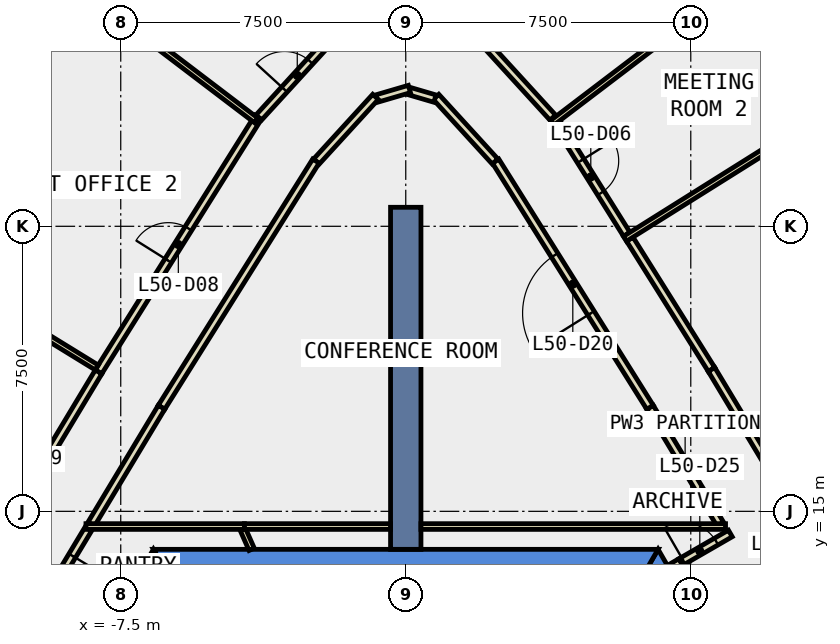
"""IFC4 building model, lengths in metres.
Left out: names, types, materials, properties, quantities, classifications, styles, units other than length and angle.
Written with IfcOpenShell. Run it as: python <this file> out.ifc"""

import sys

from ifc_helpers import new_model, si_unit, direction, frame, frame_2d, origin, place, context, subcontext, project, spatial, polyline, rectangle, outline, extrude, element, fill, save


model = new_model("IFC4")
c1 = context("Model", 3, precision=1e-05, world=origin(), true_north=direction((0.0, 1.0)))
c2 = subcontext(c1, "Body", "Model", "MODEL_VIEW")
j1 = project(units=[si_unit("LENGTHUNIT", "METRE"), si_unit("PLANEANGLEUNIT", "RADIAN")], contexts=[c1])
p1 = place(None, origin())
s1 = spatial("IfcSite", under=j1, at=p1, CompositionType="ELEMENT")
p2 = place(p1, origin())
s2 = spatial("IfcBuilding", under=s1, at=p2, CompositionType="ELEMENT")
p3 = place(p2, frame((0.0, 0.0, 223.4)))
s3 = spatial("IfcBuildingStorey", under=s2, at=p3, CompositionType="ELEMENT", Elevation=223.4)
p4 = place(p3, frame((0.0, 0.0, -0.4)))
e1 = element("IfcWall", 1, at=p4, inside=s3, PredefinedType="SHEAR", context=c2, shape_type="SweptSolid", body=[
    extrude(outline(polyline([(6.478, 12.88), (7.084, 13.23), (6.64, 14.0), (6.235, 13.3), (6.478, 12.88)])), origin(), (0.0, 0.0, 1.0), 4.2),
])
p5 = place(p3, frame((0.0, 0.0, -0.4)))
e2 = element("IfcWall", 2, at=p5, inside=s3, PredefinedType="SHEAR", context=c2, shape_type="SweptSolid", body=[
    extrude(outline(polyline([(6.64, 14.0), (-6.64, 14.0), (-6.235, 13.3), (6.235, 13.3), (6.64, 14.0)])), origin(), (0.0, 0.0, 1.0), 4.2),
])
p6 = place(p3, frame((0.0, 0.0, -0.4)))
e3 = element("IfcWall", 3, at=p6, inside=s3, PredefinedType="SHEAR", context=c2, shape_type="SweptSolid", body=[
    extrude(outline(polyline([(-11.834, 5.002), (-11.228, 4.652), (-6.235, 13.3), (-6.64, 14.0), (-11.834, 5.002)])), origin(), (0.0, 0.0, 1.0), 4.2),
])
p7 = place(p3, frame((0.0, 14.0, -0.4), z_axis=(0.0, 0.0, 1.0), x_axis=(0.0, 1.0, 0.0)))
e4 = element("IfcWall", 4, at=p7, inside=s3, PredefinedType="SHEAR", context=c2, shape_type="SweptSolid", body=[
    extrude(rectangle(XDim=9.0, YDim=0.8, at=frame_2d((4.5, 0.0))), origin(), (0.0, 0.0, 1.0), 4.2),
])
p8 = place(p3, frame((13.021, 22.374, 0.0), z_axis=(0.0, 0.0, 1.0), x_axis=(-0.531239262679, 0.847221839773, 0.0)))
e5 = element("IfcWall", 5, at=p8, inside=s3, PredefinedType="STANDARD", context=c2, shape_type="SweptSolid", body=[
    extrude(rectangle(XDim=7.339, YDim=0.3, at=frame_2d((3.67, 0.0))), origin(), (0.0, 0.0, 1.0), 3.8),
])
p9 = place(p8, frame((0.635, 0.0, 0.9)))
e6 = element("IfcOpeningElement", 6, at=p9, cuts=e5, PredefinedType="OPENING", context=c2, shape_type="SweptSolid", body=[
    extrude(rectangle(XDim=2.4, YDim=2.6, at=frame_2d((1.2, 1.3))), frame((0.0, 0.16, 0.0), z_axis=(0.0, -1.0, 0.0), x_axis=(1.0, 0.0, 0.0)), (0.0, 0.0, 1.0), 0.32),
])
p10 = place(p8, frame((4.304, 0.0, 0.9)))
e7 = element("IfcOpeningElement", 7, at=p10, cuts=e5, PredefinedType="OPENING", context=c2, shape_type="SweptSolid", body=[
    extrude(rectangle(XDim=2.4, YDim=2.6, at=frame_2d((1.2, 1.3))), frame((0.0, 0.16, 0.0), z_axis=(0.0, -1.0, 0.0), x_axis=(1.0, 0.0, 0.0)), (0.0, 0.0, 1.0), 0.32),
])
p11 = place(p3, frame((-9.122, 28.592, 0.0), z_axis=(0.0, 0.0, 1.0), x_axis=(-0.531239262679, -0.847221839773, 0.0)))
e8 = element("IfcWall", 8, at=p11, inside=s3, PredefinedType="STANDARD", context=c2, shape_type="SweptSolid", body=[
    extrude(rectangle(XDim=7.339, YDim=0.3, at=frame_2d((3.67, 0.0))), origin(), (0.0, 0.0, 1.0), 3.8),
])
p12 = place(p11, frame((0.635, 0.0, 0.9)))
e9 = element("IfcOpeningElement", 9, at=p12, cuts=e8, PredefinedType="OPENING", context=c2, shape_type="SweptSolid", body=[
    extrude(rectangle(XDim=2.4, YDim=2.6, at=frame_2d((1.2, 1.3))), frame((0.0, 0.16, 0.0), z_axis=(0.0, -1.0, 0.0), x_axis=(1.0, 0.0, 0.0)), (0.0, 0.0, 1.0), 0.32),
])
p13 = place(p11, frame((4.304, 0.0, 0.9)))
e10 = element("IfcOpeningElement", 10, at=p13, cuts=e8, PredefinedType="OPENING", context=c2, shape_type="SweptSolid", body=[
    extrude(rectangle(XDim=2.4, YDim=2.6, at=frame_2d((1.2, 1.3))), frame((0.0, 0.16, 0.0), z_axis=(0.0, -1.0, 0.0), x_axis=(1.0, 0.0, 0.0)), (0.0, 0.0, 1.0), 0.32),
])
p14 = place(p3, frame((6.934, 13.49, 0.0), z_axis=(0.0, 0.0, 1.0), x_axis=(0.865871789474, 0.500265973451, 0.0)))
e11 = element("IfcWall", 11, at=p14, inside=s3, PredefinedType="PARTITIONING", context=c2, shape_type="SweptSolid", body=[
    extrude(rectangle(XDim=0.35, YDim=0.2, at=frame_2d((0.175, 0.0))), origin(), (0.0, 0.0, 1.0), 2.4),
])
p15 = place(p3, frame((-8.353, 14.536, 0.0), z_axis=(0.0, 0.0, 1.0), x_axis=(-0.515636196259, -0.856807628997, 0.0)))
e12 = element("IfcWall", 12, at=p15, inside=s3, PredefinedType="PARTITIONING", context=c2, shape_type="SweptSolid", body=[
    extrude(rectangle(XDim=2.643, YDim=0.2, at=frame_2d((1.322, 0.0))), origin(), (0.0, 0.0, 1.0), 3.8),
])
p16 = place(p15, frame((0.822, 0.0, 0.0)))
e13 = element("IfcOpeningElement", 13, at=p16, cuts=e12, PredefinedType="OPENING", context=c2, shape_type="SweptSolid", body=[
    extrude(rectangle(XDim=1.0, YDim=2.1, at=frame_2d((0.5, 1.05))), frame((0.0, 0.11, 0.0), z_axis=(0.0, -1.0, 0.0), x_axis=(1.0, 0.0, 0.0)), (0.0, 0.0, 1.0), 0.22),
])
p17 = place(p3, frame((8.276, 14.664, 0.0), z_axis=(0.0, 0.0, 1.0), x_axis=(-0.515416266777, 0.85693994652, 0.0)))
e14 = element("IfcWall", 14, at=p17, inside=s3, PredefinedType="PARTITIONING", context=c2, shape_type="SweptSolid", body=[
    extrude(rectangle(XDim=3.587, YDim=0.2, at=frame_2d((1.793, 0.0))), origin(), (0.0, 0.0, 1.0), 3.8),
])
p18 = place(p3, frame((6.427, 17.738, 0.0), z_axis=(0.0, 0.0, 1.0), x_axis=(-0.531335643981, 0.847161397512, 0.0)))
e15 = element("IfcWall", 15, at=p18, inside=s3, PredefinedType="PARTITIONING", context=c2, shape_type="SweptSolid", body=[
    extrude(rectangle(XDim=7.647, YDim=0.2, at=frame_2d((3.823, 0.0))), origin(), (0.0, 0.0, 1.0), 3.8),
])
p19 = place(p18, frame((2.923, 0.0, 0.0)))
e16 = element("IfcOpeningElement", 16, at=p19, cuts=e15, PredefinedType="OPENING", context=c2, shape_type="SweptSolid", body=[
    extrude(rectangle(XDim=1.8, YDim=2.1, at=frame_2d((0.9, 1.05))), frame((0.0, 0.11, 0.0), z_axis=(0.0, -1.0, 0.0), x_axis=(1.0, 0.0, 0.0)), (0.0, 0.0, 1.0), 0.22),
])
p20 = place(p3, frame((2.35, 24.205, 0.0), z_axis=(0.0, 0.0, 1.0), x_axis=(-0.67475930229, 0.738037860799, 0.0)))
e17 = element("IfcWall", 17, at=p20, inside=s3, PredefinedType="PARTITIONING", context=c2, shape_type="SweptSolid", body=[
    extrude(rectangle(XDim=2.303, YDim=0.2, at=frame_2d((1.152, 0.0))), origin(), (0.0, 0.0, 1.0), 3.8),
])
p21 = place(p3, frame((0.768, 25.86, 0.0), z_axis=(0.0, 0.0, 1.0), x_axis=(-0.959714481723, 0.280977069476, 0.0)))
e18 = element("IfcWall", 18, at=p21, inside=s3, PredefinedType="PARTITIONING", context=c2, shape_type="SweptSolid", body=[
    extrude(rectangle(XDim=0.7, YDim=0.2, at=frame_2d((0.35, 0.0))), origin(), (0.0, 0.0, 1.0), 3.8),
])
p22 = place(p3, frame((0.096, 26.113, 0.0), z_axis=(0.0, 0.0, 1.0), x_axis=(-0.959723140705, -0.280947491882, 0.0)))
e19 = element("IfcWall", 19, at=p22, inside=s3, PredefinedType="PARTITIONING", context=c2, shape_type="SweptSolid", body=[
    extrude(rectangle(XDim=0.9, YDim=0.2, at=frame_2d((0.45, 0.0))), origin(), (0.0, 0.0, 1.0), 3.8),
])
p23 = place(p3, frame((-0.796, 25.905, 0.0), z_axis=(0.0, 0.0, 1.0), x_axis=(-0.67475930229, -0.738037860799, 0.0)))
e20 = element("IfcWall", 20, at=p23, inside=s3, PredefinedType="PARTITIONING", context=c2, shape_type="SweptSolid", body=[
    extrude(rectangle(XDim=2.303, YDim=0.2, at=frame_2d((1.152, 0.0))), origin(), (0.0, 0.0, 1.0), 3.8),
])
p24 = place(p3, frame((-2.364, 24.216, 0.0), z_axis=(0.0, 0.0, 1.0), x_axis=(-0.531335643981, -0.847161397512, 0.0)))
e21 = element("IfcWall", 21, at=p24, inside=s3, PredefinedType="PARTITIONING", context=c2, shape_type="SweptSolid", body=[
    extrude(rectangle(XDim=7.647, YDim=0.2, at=frame_2d((3.823, 0.0))), origin(), (0.0, 0.0, 1.0), 3.8),
])
p25 = place(p3, frame((-6.427, 17.738, 0.0), z_axis=(0.0, 0.0, 1.0), x_axis=(-0.515416266777, -0.85693994652, 0.0)))
e22 = element("IfcWall", 22, at=p25, inside=s3, PredefinedType="PARTITIONING", context=c2, shape_type="SweptSolid", body=[
    extrude(rectangle(XDim=3.587, YDim=0.2, at=frame_2d((1.793, 0.0))), origin(), (0.0, 0.0, 1.0), 3.8),
])
p26 = place(p3, frame((5.895, 22.162, 0.0), z_axis=(0.0, 0.0, 1.0), x_axis=(0.531245023709, -0.847218227368, 0.0)))
e23 = element("IfcWall", 23, at=p26, inside=s3, PredefinedType="PARTITIONING", context=c2, shape_type="SweptSolid", body=[
    extrude(rectangle(XDim=4.049, YDim=0.2, at=frame_2d((2.024, 0.0))), origin(), (0.0, 0.0, 1.0), 3.8),
])
p27 = place(p3, frame((8.046, 18.732, 0.0), z_axis=(0.0, 0.0, 1.0), x_axis=(0.515502328211, -0.856888178007, 0.0)))
e24 = element("IfcWall", 24, at=p27, inside=s3, PredefinedType="PARTITIONING", context=c2, shape_type="SweptSolid", body=[
    extrude(rectangle(XDim=8.058, YDim=0.2, at=frame_2d((4.029, 0.0))), origin(), (0.0, 0.0, 1.0), 3.8),
])
p28 = place(p27, frame((3.604, 0.0, 0.0)))
e25 = element("IfcOpeningElement", 25, at=p28, cuts=e24, PredefinedType="OPENING", context=c2, shape_type="SweptSolid", body=[
    extrude(rectangle(XDim=1.0, YDim=2.1, at=frame_2d((0.5, 1.05))), frame((0.0, 0.11, 0.0), z_axis=(0.0, -1.0, 0.0), x_axis=(1.0, 0.0, 0.0)), (0.0, 0.0, 1.0), 0.22),
])
p29 = place(p3, frame((3.923, 25.307, 0.0), z_axis=(0.0, 0.0, 1.0), x_axis=(0.531150612982, -0.847277419934, 0.0)))
e26 = element("IfcWall", 26, at=p29, inside=s3, PredefinedType="PARTITIONING", context=c2, shape_type="SweptSolid", body=[
    extrude(rectangle(XDim=3.562, YDim=0.2, at=frame_2d((1.781, 0.0))), origin(), (0.0, 0.0, 1.0), 3.8),
])
p30 = place(p29, frame((1.281, 0.0, 0.0)))
e27 = element("IfcOpeningElement", 27, at=p30, cuts=e26, PredefinedType="OPENING", context=c2, shape_type="SweptSolid", body=[
    extrude(rectangle(XDim=1.0, YDim=2.1, at=frame_2d((0.5, 1.05))), frame((0.0, 0.11, 0.0), z_axis=(0.0, -1.0, 0.0), x_axis=(1.0, 0.0, 0.0)), (0.0, 0.0, 1.0), 0.22),
])
p31 = place(p3, frame((-3.869, 25.36, 0.0), z_axis=(0.0, 0.0, 1.0), x_axis=(0.674594755709, 0.738188265668, 0.0)))
e28 = element("IfcWall", 28, at=p31, inside=s3, PredefinedType="PARTITIONING", context=c2, shape_type="SweptSolid", body=[
    extrude(rectangle(XDim=3.006, YDim=0.2, at=frame_2d((1.503, 0.0))), origin(), (0.0, 0.0, 1.0), 3.8),
])
p32 = place(p31, frame((1.003, 0.0, 0.0)))
e29 = element("IfcOpeningElement", 29, at=p32, cuts=e28, PredefinedType="OPENING", context=c2, shape_type="SweptSolid", body=[
    extrude(rectangle(XDim=1.0, YDim=2.1, at=frame_2d((0.5, 1.05))), frame((0.0, 0.11, 0.0), z_axis=(0.0, -1.0, 0.0), x_axis=(1.0, 0.0, 0.0)), (0.0, 0.0, 1.0), 0.22),
])
p33 = place(p3, frame((1.841, 27.579, 0.0), z_axis=(0.0, 0.0, 1.0), x_axis=(0.674594755709, -0.738188265668, 0.0)))
e30 = element("IfcWall", 30, at=p33, inside=s3, PredefinedType="PARTITIONING", context=c2, shape_type="SweptSolid", body=[
    extrude(rectangle(XDim=3.006, YDim=0.2, at=frame_2d((1.503, 0.0))), origin(), (0.0, 0.0, 1.0), 3.8),
])
p34 = place(p3, frame((-8.086, 18.669, 0.0), z_axis=(0.0, 0.0, 1.0), x_axis=(0.531329962263, 0.847164961033, 0.0)))
e31 = element("IfcWall", 31, at=p34, inside=s3, PredefinedType="PARTITIONING", context=c2, shape_type="SweptSolid", body=[
    extrude(rectangle(XDim=7.91, YDim=0.2, at=frame_2d((3.955, 0.0))), origin(), (0.0, 0.0, 1.0), 3.8),
])
p35 = place(p34, frame((3.455, 0.0, 0.0)))
e32 = element("IfcOpeningElement", 32, at=p35, cuts=e31, PredefinedType="OPENING", context=c2, shape_type="SweptSolid", body=[
    extrude(rectangle(XDim=1.0, YDim=2.1, at=frame_2d((0.5, 1.05))), frame((0.0, 0.11, 0.0), z_axis=(0.0, -1.0, 0.0), x_axis=(1.0, 0.0, 0.0)), (0.0, 0.0, 1.0), 0.22),
])
p36 = place(p3, frame((-12.239, 11.763, 0.0), z_axis=(0.0, 0.0, 1.0), x_axis=(0.515591302858, 0.856834644734, 0.0)))
e33 = element("IfcWall", 33, at=p36, inside=s3, PredefinedType="PARTITIONING", context=c2, shape_type="SweptSolid", body=[
    extrude(rectangle(XDim=8.059, YDim=0.2, at=frame_2d((4.029, 0.0))), origin(), (0.0, 0.0, 1.0), 3.8),
])
p37 = place(p36, frame((3.604, 0.0, 0.0)))
e34 = element("IfcOpeningElement", 34, at=p37, cuts=e33, PredefinedType="OPENING", context=c2, shape_type="SweptSolid", body=[
    extrude(rectangle(XDim=1.0, YDim=2.1, at=frame_2d((0.5, 1.05))), frame((0.0, 0.11, 0.0), z_axis=(0.0, -1.0, 0.0), x_axis=(1.0, 0.0, 0.0)), (0.0, 0.0, 1.0), 0.22),
])
p38 = place(p3, frame((-4.055, 14.0, 0.0), z_axis=(0.0, 0.0, 1.0), x_axis=(-0.404850841056, 0.914382740703, 0.0)))
e35 = element("IfcWall", 35, at=p38, inside=s3, PredefinedType="PARTITIONING", context=c2, shape_type="SweptSolid", body=[
    extrude(rectangle(XDim=0.581, YDim=0.15, at=frame_2d((0.291, 0.0))), origin(), (0.0, 0.0, 1.0), 3.8),
])
p39 = place(p3, frame((8.415, 14.6, 0.0), z_axis=(0.0, 0.0, 1.0), x_axis=(-1.0, 0.0, 0.0)))
e36 = element("IfcWall", 36, at=p39, inside=s3, PredefinedType="PARTITIONING", context=c2, shape_type="SweptSolid", body=[
    extrude(rectangle(XDim=8.015, YDim=0.15, at=frame_2d((4.008, 0.0))), origin(), (0.0, 0.0, 1.0), 3.8),
])
p40 = place(p3, frame((-4.245, 14.6, 0.0), z_axis=(0.0, 0.0, 1.0), x_axis=(-1.0, 0.0, 0.0)))
e37 = element("IfcWall", 37, at=p40, inside=s3, PredefinedType="PARTITIONING", context=c2, shape_type="SweptSolid", body=[
    extrude(rectangle(XDim=4.17, YDim=0.15, at=frame_2d((2.085, 0.0))), origin(), (0.0, 0.0, 1.0), 3.8),
])
p41 = place(p3, frame((5.77, 22.172, 0.0), z_axis=(0.0, 0.0, 1.0), x_axis=(0.847187879248, 0.531293419171, 0.0)))
e38 = element("IfcWall", 38, at=p41, inside=s3, PredefinedType="PARTITIONING", context=c2, shape_type="SweptSolid", body=[
    extrude(rectangle(XDim=6.1, YDim=0.15, at=frame_2d((3.05, 0.0))), origin(), (0.0, 0.0, 1.0), 3.8),
])
p42 = place(p3, frame((3.856, 25.225, 0.0), z_axis=(0.0, 0.0, 1.0), x_axis=(0.795987848728, 0.605312600792, 0.0)))
e39 = element("IfcWall", 39, at=p42, inside=s3, PredefinedType="PARTITIONING", context=c2, shape_type="SweptSolid", body=[
    extrude(rectangle(XDim=4.804, YDim=0.15, at=frame_2d((2.402, 0.0))), origin(), (0.0, 0.0, 1.0), 3.8),
])
p43 = place(p3, frame((-3.936, 25.286, 0.0), z_axis=(0.0, 0.0, 1.0), x_axis=(-0.795977117067, 0.605326712698, 0.0)))
e40 = element("IfcWall", 40, at=p43, inside=s3, PredefinedType="PARTITIONING", context=c2, shape_type="SweptSolid", body=[
    extrude(rectangle(XDim=4.704, YDim=0.15, at=frame_2d((2.352, 0.0))), origin(), (0.0, 0.0, 1.0), 3.8),
])
p44 = place(p3, frame((-8.131, 18.784, 0.0), z_axis=(0.0, 0.0, 1.0), x_axis=(-0.851969320918, 0.52359170755, 0.0)))
e41 = element("IfcWall", 41, at=p44, inside=s3, PredefinedType="PARTITIONING", context=c2, shape_type="SweptSolid", body=[
    extrude(rectangle(XDim=4.58, YDim=0.15, at=frame_2d((2.29, 0.0))), origin(), (0.0, 0.0, 1.0), 3.8),
])
p45 = place(p3, frame((-0.4, 14.6, 0.0), z_axis=(0.0, 0.0, 1.0), x_axis=(-1.0, 0.0, 0.0)))
e42 = element("IfcWall", 42, at=p45, inside=s3, PredefinedType="PARTITIONING", context=c2, shape_type="SweptSolid", body=[
    extrude(rectangle(XDim=3.845, YDim=0.15, at=frame_2d((1.923, 0.0))), origin(), (0.0, 0.0, 1.0), 3.8),
])
p46 = place(p3, frame((7.237, 13.665, 0.0), z_axis=(0.0, 0.0, 1.0), x_axis=(0.865999269783, 0.500045262687, 0.0)))
e43 = element("IfcWall", 43, at=p46, inside=s3, PredefinedType="PARTITIONING", context=c2, shape_type="SweptSolid", body=[
    extrude(rectangle(XDim=1.506, YDim=0.2, at=frame_2d((0.753, 0.0))), origin(), (0.0, 0.0, 1.0), 3.8),
])
p47 = place(p46, frame((0.078, 0.0, 0.0)))
e44 = element("IfcOpeningElement", 44, at=p47, cuts=e43, PredefinedType="OPENING", context=c2, shape_type="SweptSolid", body=[
    extrude(rectangle(XDim=1.0, YDim=2.1, at=frame_2d((0.5, 1.05))), frame((0.0, 0.11, 0.0), z_axis=(0.0, -1.0, 0.0), x_axis=(1.0, 0.0, 0.0)), (0.0, 0.0, 1.0), 0.22),
])
p48 = place(p30, origin())
e45 = element("IfcDoor", 45, at=p48, inside=s3, OperationType="SINGLE_SWING_LEFT", PredefinedType="DOOR", context=c2, shape_type="SweptSolid", body=[
    extrude(rectangle(XDim=1.0, YDim=2.1, at=frame_2d((0.5, 1.05))), frame((0.0, 0.025, 0.0), z_axis=(0.0, -1.0, 0.0), x_axis=(1.0, 0.0, 0.0)), (0.0, 0.0, 1.0), 0.05),
])
fill(e27, e45)
p49 = place(p32, origin())
e46 = element("IfcDoor", 46, at=p49, inside=s3, OperationType="SINGLE_SWING_LEFT", PredefinedType="DOOR", context=c2, shape_type="SweptSolid", body=[
    extrude(rectangle(XDim=1.0, YDim=2.1, at=frame_2d((0.5, 1.05))), frame((0.0, 0.025, 0.0), z_axis=(0.0, -1.0, 0.0), x_axis=(1.0, 0.0, 0.0)), (0.0, 0.0, 1.0), 0.05),
])
fill(e29, e46)
p50 = place(p35, origin())
e47 = element("IfcDoor", 47, at=p50, inside=s3, OperationType="SINGLE_SWING_RIGHT", PredefinedType="DOOR", context=c2, shape_type="SweptSolid", body=[
    extrude(rectangle(XDim=1.0, YDim=2.1, at=frame_2d((0.5, 1.05))), frame((0.0, 0.025, 0.0), z_axis=(0.0, -1.0, 0.0), x_axis=(1.0, 0.0, 0.0)), (0.0, 0.0, 1.0), 0.05),
])
fill(e32, e47)
p51 = place(p19, origin())
e48 = element("IfcDoor", 48, at=p51, inside=s3, OperationType="DOUBLE_DOOR_SINGLE_SWING", PredefinedType="DOOR", context=c2, shape_type="SweptSolid", body=[
    extrude(rectangle(XDim=1.8, YDim=2.1, at=frame_2d((0.9, 1.05))), frame((0.0, 0.025, 0.0), z_axis=(0.0, -1.0, 0.0), x_axis=(1.0, 0.0, 0.0)), (0.0, 0.0, 1.0), 0.05),
])
fill(e16, e48)
p52 = place(p47, origin())
e49 = element("IfcDoor", 49, at=p52, inside=s3, OperationType="SINGLE_SWING_LEFT", PredefinedType="DOOR", context=c2, shape_type="SweptSolid", body=[
    extrude(rectangle(XDim=1.0, YDim=2.1, at=frame_2d((0.5, 1.05))), frame((0.0, 0.025, 0.0), z_axis=(0.0, -1.0, 0.0), x_axis=(1.0, 0.0, 0.0)), (0.0, 0.0, 1.0), 0.05),
])
fill(e44, e49)
p53 = place(p16, origin())
e50 = element("IfcDoor", 50, at=p53, inside=s3, OperationType="SINGLE_SWING_LEFT", PredefinedType="DOOR", context=c2, shape_type="SweptSolid", body=[
    extrude(rectangle(XDim=1.0, YDim=2.1, at=frame_2d((0.5, 1.05))), frame((0.0, 0.025, 0.0), z_axis=(0.0, -1.0, 0.0), x_axis=(1.0, 0.0, 0.0)), (0.0, 0.0, 1.0), 0.05),
])
fill(e13, e50)
save(model, sys.argv[1])
